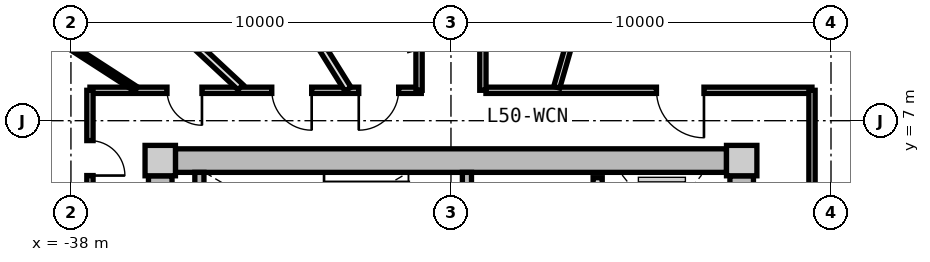
"""IFC4 building model, lengths in metres.
Left out: names, types, materials, properties, quantities, classifications, styles, units other than length and angle.
Written with IfcOpenShell. Run it as: python <this file> out.ifc"""

import sys

from ifc_helpers import new_model, si_unit, direction, frame, frame_2d, origin, origin_2d, place, context, subcontext, project, spatial, rectangle, extrude, source, transform, mapped, element, fill, save


model = new_model("IFC4")
c1 = context("Model", 3, precision=1e-05, world=origin(), true_north=direction((0.0, 1.0)))
c2 = subcontext(c1, "Body", "Model", "MODEL_VIEW")
j1 = project(units=[si_unit("LENGTHUNIT", "METRE"), si_unit("PLANEANGLEUNIT", "RADIAN")], contexts=[c1])
p1 = place(None, origin())
s1 = spatial("IfcSite", under=j1, at=p1, CompositionType="ELEMENT")
p2 = place(p1, origin())
s2 = spatial("IfcBuilding", under=s1, at=p2, CompositionType="ELEMENT")
p3 = place(p2, frame((0.0, 0.0, 161.75)))
s3 = spatial("IfcBuildingStorey", under=s2, at=p3, CompositionType="ELEMENT", Elevation=161.75)
m1 = source(origin(), c2, "Body", "SweptSolid", [
    extrude(rectangle(XDim=0.8, YDim=0.8, at=origin_2d()), origin(), (0.0, 0.0, 1.0), 3.05),
])
for number, where, z_axis, x_axis in (
    (1, (-20.35, 5.95, 0.0), (0.0, 0.0, 1.0), (1.0, 0.0, 0.0)),
    (2, (-35.65, 5.95, 0.0), (0.0, 0.0, 1.0), (1.0, 0.0, 0.0)),
):
    element("IfcColumn", number, at=place(p3, frame(where, z_axis=z_axis, x_axis=x_axis)), inside=s3, PredefinedType="COLUMN", context=c2, shape_type="MappedRepresentation", body=[
        mapped(m1, transform((0.0, 0.0, 0.0), x_axis=(1.0, 0.0, 0.0), y_axis=(0.0, 1.0, 0.0), z_axis=(0.0, 0.0, 1.0), scale=1.0)),
    ])
m2 = source(origin(), c2, "Body", "SweptSolid", [
    extrude(rectangle(XDim=14.5, YDim=0.62, at=frame_2d((7.25, 0.0))), origin(), (0.0, 0.0, 1.0), 2.81),
])
p4 = place(p3, frame((-35.25, 5.95, 0.0), z_axis=(0.0, 0.0, 1.0), x_axis=(1.0, 0.0, 0.0)))
e3 = element("IfcWall", 3, at=p4, inside=s3, PredefinedType="SHEAR", context=c2, shape_type="MappedRepresentation", body=[
    mapped(m2, transform((0.0, 0.0, 0.0), x_axis=(1.0, 0.0, 0.0), y_axis=(0.0, 1.0, 0.0), z_axis=(0.0, 0.0, 1.0), scale=1.0)),
])
m3 = source(origin(), c2, "Body", "SweptSolid", [
    extrude(rectangle(XDim=11.1, YDim=0.62, at=frame_2d((5.55, 0.0))), origin(), (0.0, 0.0, 1.0), 2.81),
])
p5 = place(p3, frame((-35.65, -5.55, 0.0), z_axis=(0.0, 0.0, 1.0), x_axis=(0.0, 1.0, 0.0)))
e4 = element("IfcWall", 4, at=p5, inside=s3, PredefinedType="SHEAR", context=c2, shape_type="MappedRepresentation", body=[
    mapped(m3, transform((0.0, 0.0, 0.0), x_axis=(1.0, 0.0, 0.0), y_axis=(0.0, 1.0, 0.0), z_axis=(0.0, 0.0, 1.0), scale=1.0)),
])
p6 = place(p5, frame((3.8, 0.0, 0.0)))
e5 = element("IfcOpeningElement", 5, at=p6, cuts=e4, PredefinedType="OPENING", context=c2, shape_type="SweptSolid", body=[
    extrude(rectangle(XDim=1.2, YDim=2.15, at=frame_2d((0.6, 1.075))), frame((0.0, 0.32, 0.0), z_axis=(0.0, -1.0, 0.0), x_axis=(1.0, 0.0, 0.0)), (0.0, 0.0, 1.0), 0.64),
])
p7 = place(p3, frame((-20.35, 5.55, 0.0), z_axis=(0.0, 0.0, 1.0), x_axis=(0.0, -1.0, 0.0)))
e6 = element("IfcWall", 6, at=p7, inside=s3, PredefinedType="SHEAR", context=c2, shape_type="MappedRepresentation", body=[
    mapped(m3, transform((0.0, 0.0, 0.0), x_axis=(1.0, 0.0, 0.0), y_axis=(0.0, 1.0, 0.0), z_axis=(0.0, 0.0, 1.0), scale=1.0)),
])
p8 = place(p7, frame((5.65, 0.0, 0.0)))
e7 = element("IfcOpeningElement", 7, at=p8, cuts=e6, PredefinedType="OPENING", context=c2, shape_type="SweptSolid", body=[
    extrude(rectangle(XDim=1.2, YDim=2.15, at=frame_2d((0.6, 1.075))), frame((0.0, 0.32, 0.0), z_axis=(0.0, -1.0, 0.0), x_axis=(1.0, 0.0, 0.0)), (0.0, 0.0, 1.0), 0.64),
])
m4 = source(origin(), c2, "Body", "SweptSolid", [
    extrude(rectangle(XDim=3.19, YDim=0.24, at=frame_2d((1.595, 0.0))), origin(), (0.0, 0.0, 1.0), 2.81),
])
p9 = place(p3, frame((-34.62, 2.45, 0.0), z_axis=(0.0, 0.0, 1.0), x_axis=(0.0, 1.0, 0.0)))
e8 = element("IfcWall", 8, at=p9, inside=s3, PredefinedType="PARTITIONING", context=c2, shape_type="MappedRepresentation", body=[
    mapped(m4, transform((0.0, 0.0, 0.0), x_axis=(1.0, 0.0, 0.0), y_axis=(0.0, 1.0, 0.0), z_axis=(0.0, 0.0, 1.0), scale=1.0)),
])
p10 = place(p3, frame((-27.58, 2.45, 0.0), z_axis=(0.0, 0.0, 1.0), x_axis=(0.0, 1.0, 0.0)))
e9 = element("IfcWall", 9, at=p10, inside=s3, PredefinedType="PARTITIONING", context=c2, shape_type="MappedRepresentation", body=[
    mapped(m4, transform((0.0, 0.0, 0.0), x_axis=(1.0, 0.0, 0.0), y_axis=(0.0, 1.0, 0.0), z_axis=(0.0, 0.0, 1.0), scale=1.0)),
])
p11 = place(p10, frame((0.55, 0.0, 0.0)))
e10 = element("IfcOpeningElement", 10, at=p11, cuts=e9, PredefinedType="OPENING", context=c2, shape_type="SweptSolid", body=[
    extrude(rectangle(XDim=1.1, YDim=2.15, at=frame_2d((0.55, 1.075))), frame((0.0, 0.13, 0.0), z_axis=(0.0, -1.0, 0.0), x_axis=(1.0, 0.0, 0.0)), (0.0, 0.0, 1.0), 0.26),
])
m5 = source(origin(), c2, "Body", "SweptSolid", [
    extrude(rectangle(XDim=5.0, YDim=0.24, at=frame_2d((2.5, 0.0))), origin(), (0.0, 0.0, 1.0), 2.795),
])
p12 = place(p3, frame((-24.14, 0.5, 0.0), z_axis=(0.0, 0.0, 1.0), x_axis=(0.0, 1.0, 0.0)))
e11 = element("IfcWall", 11, at=p12, inside=s3, PredefinedType="PARTITIONING", context=c2, shape_type="MappedRepresentation", body=[
    mapped(m5, transform((0.0, 0.0, 0.0), x_axis=(1.0, 0.0, 0.0), y_axis=(0.0, 1.0, 0.0), z_axis=(0.0, 0.0, 1.0), scale=1.0)),
])
p13 = place(p12, frame((3.05, 0.0, 0.0)))
e12 = element("IfcOpeningElement", 12, at=p13, cuts=e11, PredefinedType="OPENING", context=c2, shape_type="SweptSolid", body=[
    extrude(rectangle(XDim=1.3, YDim=2.2, at=frame_2d((0.65, 1.1))), frame((0.0, 0.13, 0.0), z_axis=(0.0, -1.0, 0.0), x_axis=(1.0, 0.0, 0.0)), (0.0, 0.0, 1.0), 0.26),
])
p14 = place(p12, frame((0.55, 0.0, 0.0)))
e13 = element("IfcOpeningElement", 13, at=p14, cuts=e11, PredefinedType="OPENING", context=c2, shape_type="SweptSolid", body=[
    extrude(rectangle(XDim=1.3, YDim=2.2, at=frame_2d((0.65, 1.1))), frame((0.0, 0.13, 0.0), z_axis=(0.0, -1.0, 0.0), x_axis=(1.0, 0.0, 0.0)), (0.0, 0.0, 1.0), 0.26),
])
m6 = source(origin(), c2, "Body", "SweptSolid", [
    extrude(rectangle(XDim=8.719, YDim=0.165, at=frame_2d((4.36, 0.0))), origin(), (0.0, 0.0, 1.0), 2.795),
])
p15 = place(p3, frame((-37.5, 7.8, 0.0), z_axis=(0.0, 0.0, 1.0), x_axis=(1.0, 0.0, 0.0)))
e14 = element("IfcWall", 14, at=p15, inside=s3, PredefinedType="PARTITIONING", context=c2, shape_type="MappedRepresentation", body=[
    mapped(m6, transform((0.0, 0.0, 0.0), x_axis=(1.0, 0.0, 0.0), y_axis=(0.0, 1.0, 0.0), z_axis=(0.0, 0.0, 1.0), scale=1.0)),
])
p16 = place(p15, frame((7.073, 0.0, 0.0)))
e15 = element("IfcOpeningElement", 15, at=p16, cuts=e14, PredefinedType="OPENING", context=c2, shape_type="SweptSolid", body=[
    extrude(rectangle(XDim=1.05, YDim=2.15, at=frame_2d((0.525, 1.075))), frame((0.0, 0.093, 0.0), z_axis=(0.0, -1.0, 0.0), x_axis=(1.0, 0.0, 0.0)), (0.0, 0.0, 1.0), 0.185),
])
p17 = place(p15, frame((4.785, 0.0, 0.0)))
e16 = element("IfcOpeningElement", 16, at=p17, cuts=e14, PredefinedType="OPENING", context=c2, shape_type="SweptSolid", body=[
    extrude(rectangle(XDim=1.05, YDim=2.15, at=frame_2d((0.525, 1.075))), frame((0.0, 0.093, 0.0), z_axis=(0.0, -1.0, 0.0), x_axis=(1.0, 0.0, 0.0)), (0.0, 0.0, 1.0), 0.185),
])
p18 = place(p15, frame((2.028, 0.0, 0.0)))
e17 = element("IfcOpeningElement", 17, at=p18, cuts=e14, PredefinedType="OPENING", context=c2, shape_type="SweptSolid", body=[
    extrude(rectangle(XDim=0.92, YDim=2.1, at=frame_2d((0.46, 1.05))), frame((0.0, 0.093, 0.0), z_axis=(0.0, -1.0, 0.0), x_axis=(1.0, 0.0, 0.0)), (0.0, 0.0, 1.0), 0.185),
])
m7 = source(origin(), c2, "Body", "SweptSolid", [
    extrude(rectangle(XDim=8.58, YDim=0.165, at=frame_2d((4.29, 0.0))), origin(), (0.0, 0.0, 1.0), 2.795),
])
p19 = place(p3, frame((-27.08, 7.8, 0.0), z_axis=(0.0, 0.0, 1.0), x_axis=(1.0, 0.0, 0.0)))
e18 = element("IfcWall", 18, at=p19, inside=s3, PredefinedType="PARTITIONING", context=c2, shape_type="MappedRepresentation", body=[
    mapped(m7, transform((0.0, 0.0, 0.0), x_axis=(1.0, 0.0, 0.0), y_axis=(0.0, 1.0, 0.0), z_axis=(0.0, 0.0, 1.0), scale=1.0)),
])
p20 = place(p19, frame((4.487, 0.0, 0.0)))
e19 = element("IfcOpeningElement", 19, at=p20, cuts=e18, PredefinedType="OPENING", context=c2, shape_type="SweptSolid", body=[
    extrude(rectangle(XDim=1.25, YDim=2.2, at=frame_2d((0.625, 1.1))), frame((0.0, 0.093, 0.0), z_axis=(0.0, -1.0, 0.0), x_axis=(1.0, 0.0, 0.0)), (0.0, 0.0, 1.0), 0.185),
])
m8 = source(origin(), c2, "Body", "SweptSolid", [
    extrude(rectangle(XDim=6.88, YDim=0.165, at=frame_2d((3.44, 0.0))), origin(), (0.0, 0.0, 1.0), 2.795),
])
p21 = place(p3, frame((-37.5, 0.92, 0.0), z_axis=(0.0, 0.0, 1.0), x_axis=(0.0, 1.0, 0.0)))
e20 = element("IfcWall", 20, at=p21, inside=s3, PredefinedType="PARTITIONING", context=c2, shape_type="MappedRepresentation", body=[
    mapped(m8, transform((0.0, 0.0, 0.0), x_axis=(1.0, 0.0, 0.0), y_axis=(0.0, 1.0, 0.0), z_axis=(0.0, 0.0, 1.0), scale=1.0)),
])
p22 = place(p21, frame((4.636, 0.0, 0.0)))
e21 = element("IfcOpeningElement", 21, at=p22, cuts=e20, PredefinedType="OPENING", context=c2, shape_type="SweptSolid", body=[
    extrude(rectangle(XDim=0.92, YDim=2.1, at=frame_2d((0.46, 1.05))), frame((0.0, 0.093, 0.0), z_axis=(0.0, -1.0, 0.0), x_axis=(1.0, 0.0, 0.0)), (0.0, 0.0, 1.0), 0.185),
])
p23 = place(p3, frame((-18.5, 7.8, 0.0), z_axis=(0.0, 0.0, 1.0), x_axis=(0.0, -1.0, 0.0)))
e22 = element("IfcWall", 22, at=p23, inside=s3, PredefinedType="PARTITIONING", context=c2, shape_type="MappedRepresentation", body=[
    mapped(m8, transform((0.0, 0.0, 0.0), x_axis=(1.0, 0.0, 0.0), y_axis=(0.0, 1.0, 0.0), z_axis=(0.0, 0.0, 1.0), scale=1.0)),
])
m9 = source(origin(), c2, "Body", "SweptSolid", [
    extrude(rectangle(XDim=9.73, YDim=0.165, at=frame_2d((4.865, 0.0))), origin(), (0.0, 0.0, 1.0), 2.345),
])
p24 = place(p3, frame((-25.217, 7.88, 0.0), z_axis=(0.0, 0.0, 1.0), x_axis=(0.27679492614, 0.960929013436, 0.0)))
e23 = element("IfcWall", 23, at=p24, inside=s3, PredefinedType="PARTITIONING", context=c2, shape_type="MappedRepresentation", body=[
    mapped(m9, transform((0.0, 0.0, 0.0), x_axis=(1.0, 0.0, 0.0), y_axis=(0.0, 1.0, 0.0), z_axis=(0.0, 0.0, 1.0), scale=1.0)),
])
m10 = source(origin(), c2, "Body", "SweptSolid", [
    extrude(rectangle(XDim=6.193, YDim=0.165, at=frame_2d((3.096, 0.0))), origin(), (0.0, 0.0, 1.0), 2.345),
])
p25 = place(p3, frame((-37.58, 4.419, 0.0), z_axis=(0.0, 0.0, 1.0), x_axis=(-0.970309243466, 0.241867674657, 0.0)))
e24 = element("IfcWall", 24, at=p25, inside=s3, PredefinedType="PARTITIONING", context=c2, shape_type="MappedRepresentation", body=[
    mapped(m10, transform((0.0, 0.0, 0.0), x_axis=(1.0, 0.0, 0.0), y_axis=(0.0, 1.0, 0.0), z_axis=(0.0, 0.0, 1.0), scale=1.0)),
])
m11 = source(origin(), c2, "Body", "SweptSolid", [
    extrude(rectangle(XDim=8.305, YDim=0.165, at=frame_2d((4.153, 0.0))), origin(), (0.0, 0.0, 1.0), 2.345),
])
p26 = place(p3, frame((-18.42, 3.908, 0.0), z_axis=(0.0, 0.0, 1.0), x_axis=(0.970309994378, 0.241864662175, 0.0)))
e25 = element("IfcWall", 25, at=p26, inside=s3, PredefinedType="PARTITIONING", context=c2, shape_type="MappedRepresentation", body=[
    mapped(m11, transform((0.0, 0.0, 0.0), x_axis=(1.0, 0.0, 0.0), y_axis=(0.0, 1.0, 0.0), z_axis=(0.0, 0.0, 1.0), scale=1.0)),
])
m12 = source(origin(), c2, "Body", "SweptSolid", [
    extrude(rectangle(XDim=9.48, YDim=0.165, at=frame_2d((4.74, 0.0))), origin(), (0.0, 0.0, 1.0), 2.795),
])
p27 = place(p3, frame((-28.84, 7.8, 0.0), z_axis=(0.0, 0.0, 1.0), x_axis=(0.0, 1.0, 0.0)))
e26 = element("IfcWall", 26, at=p27, inside=s3, PredefinedType="PARTITIONING", context=c2, shape_type="MappedRepresentation", body=[
    mapped(m12, transform((0.0, 0.0, 0.0), x_axis=(1.0, 0.0, 0.0), y_axis=(0.0, 1.0, 0.0), z_axis=(0.0, 0.0, 1.0), scale=1.0)),
])
p28 = place(p27, frame((4.521, 0.0, 0.0)))
e27 = element("IfcOpeningElement", 27, at=p28, cuts=e26, PredefinedType="OPENING", context=c2, shape_type="SweptSolid", body=[
    extrude(rectangle(XDim=0.95, YDim=2.1, at=frame_2d((0.475, 1.05))), frame((0.0, 0.093, 0.0), z_axis=(0.0, -1.0, 0.0), x_axis=(1.0, 0.0, 0.0)), (0.0, 0.0, 1.0), 0.185),
])
p29 = place(p3, frame((-27.16, 17.28, 0.0), z_axis=(0.0, 0.0, 1.0), x_axis=(0.0, -1.0, 0.0)))
e28 = element("IfcWall", 28, at=p29, inside=s3, PredefinedType="PARTITIONING", context=c2, shape_type="MappedRepresentation", body=[
    mapped(m12, transform((0.0, 0.0, 0.0), x_axis=(1.0, 0.0, 0.0), y_axis=(0.0, 1.0, 0.0), z_axis=(0.0, 0.0, 1.0), scale=1.0)),
])
p30 = place(p29, frame((4.265, 0.0, 0.0)))
e29 = element("IfcOpeningElement", 29, at=p30, cuts=e28, PredefinedType="OPENING", context=c2, shape_type="SweptSolid", body=[
    extrude(rectangle(XDim=0.95, YDim=2.1, at=frame_2d((0.475, 1.05))), frame((0.0, 0.093, 0.0), z_axis=(0.0, -1.0, 0.0), x_axis=(1.0, 0.0, 0.0)), (0.0, 0.0, 1.0), 0.185),
])
m13 = source(origin(), c2, "Body", "SweptSolid", [
    extrude(rectangle(XDim=7.648, YDim=0.19, at=frame_2d((3.824, 0.0))), origin(), (0.0, 0.0, 1.0), 2.345),
])
p31 = place(p3, frame((-33.538, 7.88, 0.0), z_axis=(0.0, 0.0, 1.0), x_axis=(-0.732167856666, 0.681124239522, 0.0)))
e30 = element("IfcWall", 30, at=p31, inside=s3, PredefinedType="PARTITIONING", context=c2, shape_type="MappedRepresentation", body=[
    mapped(m13, transform((0.0, 0.0, 0.0), x_axis=(1.0, 0.0, 0.0), y_axis=(0.0, 1.0, 0.0), z_axis=(0.0, 0.0, 1.0), scale=1.0)),
])
m14 = source(origin(), c2, "Body", "SweptSolid", [
    extrude(rectangle(XDim=8.638, YDim=0.19, at=frame_2d((4.319, 0.0))), origin(), (0.0, 0.0, 1.0), 2.795),
])
p32 = place(p3, frame((-30.711, 7.83, 0.0), z_axis=(0.0, 0.0, 1.0), x_axis=(-0.529150133108, 0.848528217935, 0.0)))
e31 = element("IfcWall", 31, at=p32, inside=s3, PredefinedType="PARTITIONING", context=c2, shape_type="MappedRepresentation", body=[
    mapped(m14, transform((0.0, 0.0, 0.0), x_axis=(1.0, 0.0, 0.0), y_axis=(0.0, 1.0, 0.0), z_axis=(0.0, 0.0, 1.0), scale=1.0)),
])
m15 = source(origin(), c2, "Body", "SweptSolid", [
    extrude(rectangle(XDim=5.197, YDim=0.14, at=frame_2d((2.598, 0.0))), origin(), (0.0, 0.0, 1.0), 2.795),
])
p33 = place(p3, frame((-36.286, 7.83, 0.0), z_axis=(0.0, 0.0, 1.0), x_axis=(-0.839929187515, 0.542696010637, 0.0)))
e32 = element("IfcWall", 32, at=p33, inside=s3, PredefinedType="PARTITIONING", context=c2, shape_type="MappedRepresentation", body=[
    mapped(m15, transform((0.0, 0.0, 0.0), x_axis=(1.0, 0.0, 0.0), y_axis=(0.0, 1.0, 0.0), z_axis=(0.0, 0.0, 1.0), scale=1.0)),
])
m16 = source(origin(), c2, "Body", "SweptSolid", [
    extrude(rectangle(XDim=1.25, YDim=2.2, at=frame_2d((0.625, 1.1))), frame((0.0, 0.025, 0.0), z_axis=(0.0, -1.0, 0.0), x_axis=(1.0, 0.0, 0.0)), (0.0, 0.0, 1.0), 0.05),
])
p34 = place(p20, frame((1.25, 0.0, 0.0), z_axis=(0.0, 0.0, 1.0), x_axis=(-1.0, 0.0, 0.0)))
e33 = element("IfcDoor", 33, at=p34, inside=s3, OperationType="SINGLE_SWING_LEFT", PredefinedType="DOOR", context=c2, shape_type="MappedRepresentation", body=[
    mapped(m16, transform((0.0, 0.0, 0.0), x_axis=(1.0, 0.0, 0.0), y_axis=(0.0, 1.0, 0.0), z_axis=(0.0, 0.0, 1.0), scale=1.0)),
])
fill(e19, e33)
m17 = source(origin(), c2, "Body", "SweptSolid", [
    extrude(rectangle(XDim=1.05, YDim=2.15, at=frame_2d((0.525, 1.075))), frame((0.0, 0.025, 0.0), z_axis=(0.0, -1.0, 0.0), x_axis=(1.0, 0.0, 0.0)), (0.0, 0.0, 1.0), 0.05),
])
p35 = place(p16, frame((1.05, 0.0, 0.0), z_axis=(0.0, 0.0, 1.0), x_axis=(-1.0, 0.0, 0.0)))
e34 = element("IfcDoor", 34, at=p35, inside=s3, OperationType="SINGLE_SWING_RIGHT", PredefinedType="DOOR", context=c2, shape_type="MappedRepresentation", body=[
    mapped(m17, transform((0.0, 0.0, 0.0), x_axis=(1.0, 0.0, 0.0), y_axis=(0.0, 1.0, 0.0), z_axis=(0.0, 0.0, 1.0), scale=1.0)),
])
fill(e15, e34)
p36 = place(p17, frame((1.05, 0.0, 0.0), z_axis=(0.0, 0.0, 1.0), x_axis=(-1.0, 0.0, 0.0)))
e35 = element("IfcDoor", 35, at=p36, inside=s3, OperationType="SINGLE_SWING_LEFT", PredefinedType="DOOR", context=c2, shape_type="MappedRepresentation", body=[
    mapped(m17, transform((0.0, 0.0, 0.0), x_axis=(1.0, 0.0, 0.0), y_axis=(0.0, 1.0, 0.0), z_axis=(0.0, 0.0, 1.0), scale=1.0)),
])
fill(e16, e35)
m18 = source(origin(), c2, "Body", "SweptSolid", [
    extrude(rectangle(XDim=0.92, YDim=2.1, at=frame_2d((0.46, 1.05))), frame((0.0, 0.025, 0.0), z_axis=(0.0, -1.0, 0.0), x_axis=(1.0, 0.0, 0.0)), (0.0, 0.0, 1.0), 0.05),
])
p37 = place(p18, frame((0.92, 0.0, 0.0), z_axis=(0.0, 0.0, 1.0), x_axis=(-1.0, 0.0, 0.0)))
e36 = element("IfcDoor", 36, at=p37, inside=s3, OperationType="SINGLE_SWING_LEFT", PredefinedType="DOOR", context=c2, shape_type="MappedRepresentation", body=[
    mapped(m18, transform((0.0, 0.0, 0.0), x_axis=(1.0, 0.0, 0.0), y_axis=(0.0, 1.0, 0.0), z_axis=(0.0, 0.0, 1.0), scale=1.0)),
])
fill(e17, e36)
p38 = place(p22, frame((0.92, 0.0, 0.0), z_axis=(0.0, 0.0, 1.0), x_axis=(-1.0, 0.0, 0.0)))
e37 = element("IfcDoor", 37, at=p38, inside=s3, OperationType="SINGLE_SWING_RIGHT", PredefinedType="DOOR", context=c2, shape_type="MappedRepresentation", body=[
    mapped(m18, transform((0.0, 0.0, 0.0), x_axis=(1.0, 0.0, 0.0), y_axis=(0.0, 1.0, 0.0), z_axis=(0.0, 0.0, 1.0), scale=1.0)),
])
fill(e21, e37)
save(model, sys.argv[1])
